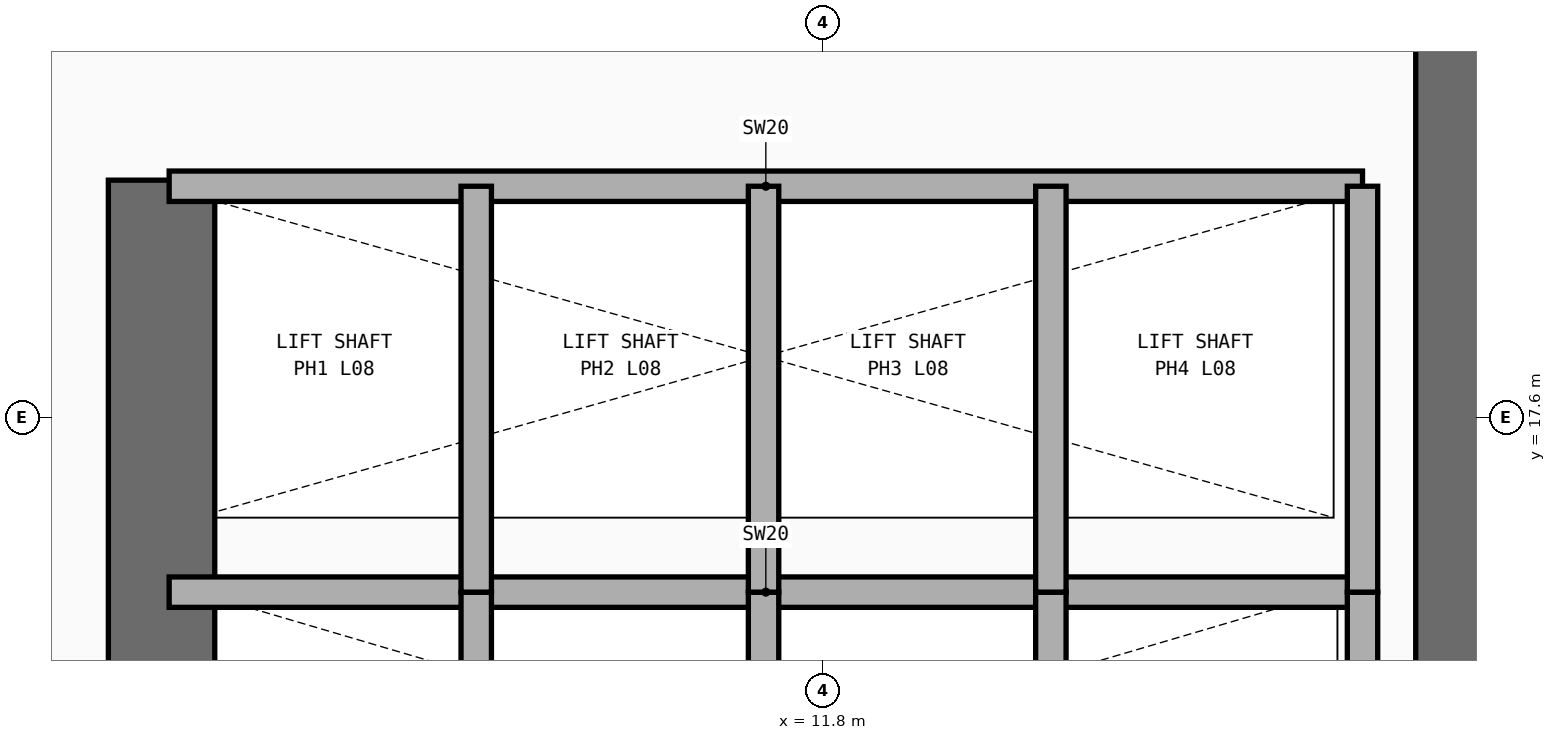
"""IFC4 building model, lengths in metres.
Left out: names, types, materials, properties, quantities, classifications, styles, units other than length and angle.
Written with IfcOpenShell. Run it as: python <this file> out.ifc"""

import sys

from ifc_helpers import new_model, si_unit, direction, frame, frame_2d, origin, place, context, subcontext, project, spatial, rectangle, extrude, element, save


model = new_model("IFC4")
c1 = context("Model", 3, precision=1e-05, world=origin(), true_north=direction((0.0, 1.0)))
c2 = subcontext(c1, "Body", "Model", "MODEL_VIEW")
j1 = project(units=[si_unit("LENGTHUNIT", "METRE"), si_unit("PLANEANGLEUNIT", "RADIAN")], contexts=[c1])
p1 = place(None, origin())
s1 = spatial("IfcSite", under=j1, at=p1, CompositionType="ELEMENT")
p2 = place(p1, origin())
s2 = spatial("IfcBuilding", under=s1, at=p2, CompositionType="ELEMENT")
p3 = place(p2, frame((0.0, 0.0, 33.4)))
s3 = spatial("IfcBuildingStorey", under=s2, at=p3, CompositionType="ELEMENT", Elevation=33.4)
p4 = place(p3, frame((7.45, 14.35, 0.0), z_axis=(0.0, 0.0, 1.0), x_axis=(0.0, 1.0, 0.0)))
e1 = element("IfcWall", 1, at=p4, inside=s3, PredefinedType="SHEAR", context=c2, shape_type="SweptSolid", body=[
    extrude(rectangle(XDim=4.81, YDim=0.7, at=frame_2d((2.405, 0.0))), origin(), (0.0, 0.0, 1.0), 3.54),
])
p5 = place(p3, frame((16.05, 14.4, 0.0), z_axis=(0.0, 0.0, 1.0), x_axis=(0.0, 1.0, 0.0)))
e2 = element("IfcWall", 2, at=p5, inside=s3, PredefinedType="SHEAR", context=c2, shape_type="SweptSolid", body=[
    extrude(rectangle(XDim=9.1, YDim=0.7, at=frame_2d((4.55, 0.0))), origin(), (0.0, 0.0, 1.0), 3.54),
])
p6 = place(p3, frame((7.5, 16.45, 0.0), z_axis=(0.0, 0.0, 1.0), x_axis=(1.0, 0.0, 0.0)))
e3 = element("IfcWall", 3, at=p6, inside=s3, PredefinedType="PARTITIONING", context=c2, shape_type="SweptSolid", body=[
    extrude(rectangle(XDim=7.85, YDim=0.2, at=frame_2d((3.925, 0.0))), origin(), (0.0, 0.0, 1.0), 3.54),
])
for number, where, z_axis, x_axis in (
    (4, (15.35, 14.22, 0.0), (0.0, 0.0, 1.0), (0.0, 1.0, 0.0)),
    (5, (9.52, 14.22, 0.0), (0.0, 0.0, 1.0), (0.0, 1.0, 0.0)),
    (6, (11.41, 14.22, 0.0), (0.0, 0.0, 1.0), (0.0, 1.0, 0.0)),
    (7, (13.3, 14.22, 0.0), (0.0, 0.0, 1.0), (0.0, 1.0, 0.0)),
):
    element("IfcWall", number, at=place(p3, frame(where, z_axis=z_axis, x_axis=x_axis)), inside=s3, PredefinedType="PARTITIONING", context=c2, shape_type="SweptSolid", body=[
        extrude(rectangle(XDim=2.23, YDim=0.2, at=frame_2d((1.115, 0.0))), origin(), (0.0, 0.0, 1.0), 3.54),
    ])
p7 = place(p3, frame((7.5, 19.12, 0.0), z_axis=(0.0, 0.0, 1.0), x_axis=(1.0, 0.0, 0.0)))
e8 = element("IfcWall", 8, at=p7, inside=s3, PredefinedType="PARTITIONING", context=c2, shape_type="SweptSolid", body=[
    extrude(rectangle(XDim=7.85, YDim=0.2, at=frame_2d((3.925, 0.0))), origin(), (0.0, 0.0, 1.0), 3.54),
])
for number, where, z_axis, x_axis in (
    (9, (15.35, 16.45, 0.0), (0.0, 0.0, 1.0), (0.0, 1.0, 0.0)),
    (10, (9.52, 16.45, 0.0), (0.0, 0.0, 1.0), (0.0, 1.0, 0.0)),
    (11, (11.41, 16.45, 0.0), (0.0, 0.0, 1.0), (0.0, 1.0, 0.0)),
    (12, (13.3, 16.45, 0.0), (0.0, 0.0, 1.0), (0.0, 1.0, 0.0)),
):
    element("IfcWall", number, at=place(p3, frame(where, z_axis=z_axis, x_axis=x_axis)), inside=s3, PredefinedType="PARTITIONING", context=c2, shape_type="SweptSolid", body=[
        extrude(rectangle(XDim=2.67, YDim=0.2, at=frame_2d((1.335, 0.0))), origin(), (0.0, 0.0, 1.0), 3.54),
    ])
save(model, sys.argv[1])
